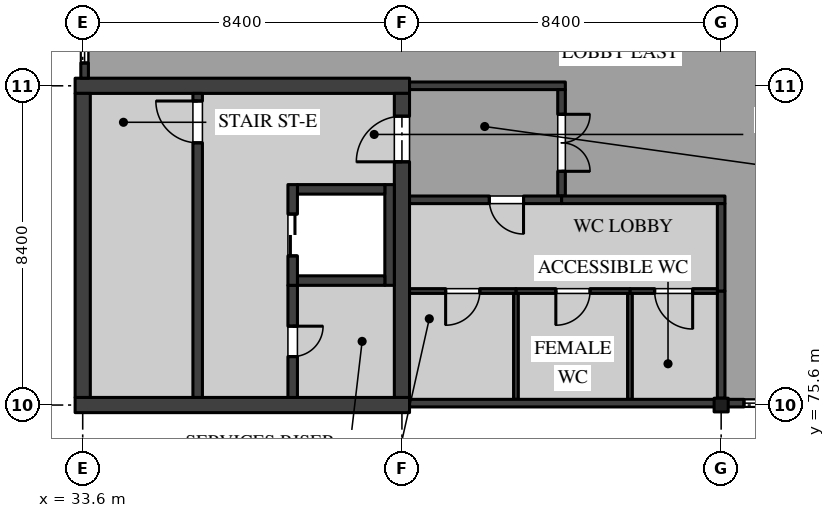
"""IFC4 building model, lengths in metres.
Left out: names, types, materials, properties, quantities, classifications, styles, units other than length and angle.
Written with IfcOpenShell. Run it as: python <this file> out.ifc"""

import sys

from ifc_helpers import new_model, si_unit, direction, frame, frame_2d, origin, origin_2d, place, context, subcontext, project, spatial, rectangle, i_section, extrude, element, fill, save


model = new_model("IFC4")
c1 = context("Model", 3, precision=1e-05, world=origin(), true_north=direction((0.0, 1.0)))
c2 = subcontext(c1, "Body", "Model", "MODEL_VIEW")
j1 = project(units=[si_unit("LENGTHUNIT", "METRE"), si_unit("PLANEANGLEUNIT", "RADIAN")], contexts=[c1])
p1 = place(None, origin())
s1 = spatial("IfcSite", under=j1, at=p1, CompositionType="ELEMENT")
p2 = place(p1, origin())
s2 = spatial("IfcBuilding", under=s1, at=p2, CompositionType="ELEMENT")
p3 = place(p2, frame((0.0, 0.0, 9.9)))
s3 = spatial("IfcBuildingStorey", under=s2, at=p3, CompositionType="ELEMENT", Elevation=9.9)
p4 = place(p3, frame((50.4, 75.6, 0.0), z_axis=(0.0, 0.0, 1.0), x_axis=(1.0, 0.0, 0.0)))
e1 = element("IfcColumn", 1, at=p4, inside=s3, PredefinedType="COLUMN", context=c2, shape_type="SweptSolid", body=[
    extrude(i_section(OverallWidth=0.371, OverallDepth=0.361, WebThickness=0.012, FlangeThickness=0.02, FilletRadius=0.015, at=origin_2d()), origin(), (0.0, 0.0, 1.0), 4.5),
])
for number, where, z_axis, x_axis in (
    (2, (33.4, 75.6, 0.0), (0.0, 0.0, 1.0), (1.0, 0.0, 0.0)),
    (3, (33.4, 84.0, 0.0), (0.0, 0.0, 1.0), (1.0, 0.0, 0.0)),
):
    element("IfcWall", number, at=place(p3, frame(where, z_axis=z_axis, x_axis=x_axis)), inside=s3, PredefinedType="SHEAR", context=c2, shape_type="SweptSolid", body=[
        extrude(rectangle(XDim=8.8, YDim=0.4, at=frame_2d((4.4, 0.0))), origin(), (0.0, 0.0, 1.0), 4.25),
    ])
p5 = place(p3, frame((33.6, 75.8, 0.0), z_axis=(0.0, 0.0, 1.0), x_axis=(0.0, 1.0, 0.0)))
e4 = element("IfcWall", 4, at=p5, inside=s3, PredefinedType="SHEAR", context=c2, shape_type="SweptSolid", body=[
    extrude(rectangle(XDim=8.0, YDim=0.4, at=frame_2d((4.0, 0.0))), origin(), (0.0, 0.0, 1.0), 4.25),
])
p6 = place(p3, frame((42.0, 75.8, 0.0), z_axis=(0.0, 0.0, 1.0), x_axis=(0.0, 1.0, 0.0)))
e5 = element("IfcWall", 5, at=p6, inside=s3, PredefinedType="SHEAR", context=c2, shape_type="SweptSolid", body=[
    extrude(rectangle(XDim=8.0, YDim=0.4, at=frame_2d((4.0, 0.0))), origin(), (0.0, 0.0, 1.0), 4.25),
])
p7 = place(p6, frame((6.2, 0.0, 0.0)))
e6 = element("IfcOpeningElement", 6, at=p7, cuts=e5, PredefinedType="OPENING", context=c2, shape_type="SweptSolid", body=[
    extrude(rectangle(XDim=1.2, YDim=2.1, at=frame_2d((0.6, 1.05))), frame((0.0, 0.21, 0.0), z_axis=(0.0, -1.0, 0.0), x_axis=(1.0, 0.0, 0.0)), (0.0, 0.0, 1.0), 0.42),
])
p8 = place(p3, frame((36.625, 83.8, 0.0), z_axis=(0.0, 0.0, 1.0), x_axis=(0.0, -1.0, 0.0)))
e7 = element("IfcWall", 7, at=p8, inside=s3, PredefinedType="SOLIDWALL", context=c2, shape_type="SweptSolid", body=[
    extrude(rectangle(XDim=8.0, YDim=0.25, at=frame_2d((4.0, 0.0))), origin(), (0.0, 0.0, 1.0), 4.25),
])
p9 = place(p8, frame((0.2, 0.0, 0.0)))
e8 = element("IfcOpeningElement", 8, at=p9, cuts=e7, PredefinedType="OPENING", context=c2, shape_type="SweptSolid", body=[
    extrude(rectangle(XDim=1.1, YDim=2.1, at=frame_2d((0.55, 1.05))), frame((0.0, 0.135, 0.0), z_axis=(0.0, -1.0, 0.0), x_axis=(1.0, 0.0, 0.0)), (0.0, 0.0, 1.0), 0.27),
])
p10 = place(p3, frame((39.125, 78.75, 0.0), z_axis=(0.0, 0.0, 1.0), x_axis=(0.0, -1.0, 0.0)))
e9 = element("IfcWall", 9, at=p10, inside=s3, PredefinedType="SOLIDWALL", context=c2, shape_type="SweptSolid", body=[
    extrude(rectangle(XDim=2.95, YDim=0.25, at=frame_2d((1.475, 0.0))), origin(), (0.0, 0.0, 1.0), 4.25),
])
p11 = place(p10, frame((1.075, 0.0, 0.0)))
e10 = element("IfcOpeningElement", 10, at=p11, cuts=e9, PredefinedType="OPENING", context=c2, shape_type="SweptSolid", body=[
    extrude(rectangle(XDim=0.8, YDim=2.1, at=frame_2d((0.4, 1.05))), frame((0.0, 0.135, 0.0), z_axis=(0.0, -1.0, 0.0), x_axis=(1.0, 0.0, 0.0)), (0.0, 0.0, 1.0), 0.27),
])
p12 = place(p3, frame((41.675, 78.75, 0.0), z_axis=(0.0, 0.0, 1.0), x_axis=(0.0, 1.0, 0.0)))
e11 = element("IfcWall", 11, at=p12, inside=s3, PredefinedType="SOLIDWALL", context=c2, shape_type="SweptSolid", body=[
    extrude(rectangle(XDim=2.65, YDim=0.25, at=frame_2d((1.325, 0.0))), origin(), (0.0, 0.0, 1.0), 4.25),
])
for number, where, z_axis, x_axis in (
    (12, (39.25, 81.275, 0.0), (0.0, 0.0, 1.0), (1.0, 0.0, 0.0)),
    (13, (39.25, 78.875, 0.0), (0.0, 0.0, 1.0), (1.0, 0.0, 0.0)),
):
    element("IfcWall", number, at=place(p3, frame(where, z_axis=z_axis, x_axis=x_axis)), inside=s3, PredefinedType="SOLIDWALL", context=c2, shape_type="SweptSolid", body=[
        extrude(rectangle(XDim=2.3, YDim=0.25, at=frame_2d((1.15, 0.0))), origin(), (0.0, 0.0, 1.0), 4.25),
    ])
p13 = place(p3, frame((39.125, 78.75, 0.0), z_axis=(0.0, 0.0, 1.0), x_axis=(0.0, 1.0, 0.0)))
e14 = element("IfcWall", 14, at=p13, inside=s3, PredefinedType="SOLIDWALL", context=c2, shape_type="SweptSolid", body=[
    extrude(rectangle(XDim=2.65, YDim=0.25, at=frame_2d((1.325, 0.0))), origin(), (0.0, 0.0, 1.0), 4.25),
])
p14 = place(p13, frame((0.775, 0.0, 0.0)))
e15 = element("IfcOpeningElement", 15, at=p14, cuts=e14, PredefinedType="OPENING", context=c2, shape_type="SweptSolid", body=[
    extrude(rectangle(XDim=1.1, YDim=2.1, at=frame_2d((0.55, 1.05))), frame((0.0, 0.135, 0.0), z_axis=(0.0, -1.0, 0.0), x_axis=(1.0, 0.0, 0.0)), (0.0, 0.0, 1.0), 0.27),
])
p15 = place(p3, frame((42.2, 84.0, 0.0), z_axis=(0.0, 0.0, 1.0), x_axis=(1.0, 0.0, 0.0)))
e16 = element("IfcWall", 16, at=p15, inside=s3, PredefinedType="PARTITIONING", context=c2, shape_type="SweptSolid", body=[
    extrude(rectangle(XDim=4.1, YDim=0.2, at=frame_2d((2.05, 0.0))), origin(), (0.0, 0.0, 1.0), 4.25),
])
p16 = place(p3, frame((46.2, 81.1, 0.0), z_axis=(0.0, 0.0, 1.0), x_axis=(0.0, 1.0, 0.0)))
e17 = element("IfcWall", 17, at=p16, inside=s3, PredefinedType="PARTITIONING", context=c2, shape_type="SweptSolid", body=[
    extrude(rectangle(XDim=2.8, YDim=0.2, at=frame_2d((1.4, 0.0))), origin(), (0.0, 0.0, 1.0), 4.25),
])
p17 = place(p16, frame((0.65, 0.0, 0.0)))
e18 = element("IfcOpeningElement", 18, at=p17, cuts=e17, PredefinedType="OPENING", context=c2, shape_type="SweptSolid", body=[
    extrude(rectangle(XDim=1.5, YDim=2.1, at=frame_2d((0.75, 1.05))), frame((0.0, 0.11, 0.0), z_axis=(0.0, -1.0, 0.0), x_axis=(1.0, 0.0, 0.0)), (0.0, 0.0, 1.0), 0.22),
])
p18 = place(p3, frame((50.4, 75.78, 0.0), z_axis=(0.0, 0.0, 1.0), x_axis=(0.0, 1.0, 0.0)))
e19 = element("IfcWall", 19, at=p18, inside=s3, PredefinedType="PARTITIONING", context=c2, shape_type="SweptSolid", body=[
    extrude(rectangle(XDim=2.82, YDim=0.2, at=frame_2d((1.41, 0.0))), origin(), (0.0, 0.0, 1.0), 4.25),
])
p19 = place(p3, frame((46.2, 81.0, 0.0), z_axis=(0.0, 0.0, 1.0), x_axis=(1.0, 0.0, 0.0)))
e20 = element("IfcWall", 20, at=p19, inside=s3, PredefinedType="PARTITIONING", context=c2, shape_type="SweptSolid", body=[
    extrude(rectangle(XDim=4.3, YDim=0.2, at=frame_2d((2.15, 0.0))), origin(), (0.0, 0.0, 1.0), 4.25),
])
p20 = place(p3, frame((50.4, 78.6, 0.0), z_axis=(0.0, 0.0, 1.0), x_axis=(0.0, 1.0, 0.0)))
e21 = element("IfcWall", 21, at=p20, inside=s3, PredefinedType="PARTITIONING", context=c2, shape_type="SweptSolid", body=[
    extrude(rectangle(XDim=2.3, YDim=0.2, at=frame_2d((1.15, 0.0))), origin(), (0.0, 0.0, 1.0), 4.25),
])
p21 = place(p3, frame((42.2, 81.0, 0.0), z_axis=(0.0, 0.0, 1.0), x_axis=(1.0, 0.0, 0.0)))
e22 = element("IfcWall", 22, at=p21, inside=s3, PredefinedType="PARTITIONING", context=c2, shape_type="SweptSolid", body=[
    extrude(rectangle(XDim=4.0, YDim=0.2, at=frame_2d((2.0, 0.0))), origin(), (0.0, 0.0, 1.0), 4.25),
])
p22 = place(p21, frame((2.1, 0.0, 0.0)))
e23 = element("IfcOpeningElement", 23, at=p22, cuts=e22, PredefinedType="OPENING", context=c2, shape_type="SweptSolid", body=[
    extrude(rectangle(XDim=0.9, YDim=2.1, at=frame_2d((0.45, 1.05))), frame((0.0, 0.11, 0.0), z_axis=(0.0, -1.0, 0.0), x_axis=(1.0, 0.0, 0.0)), (0.0, 0.0, 1.0), 0.22),
])
p23 = place(p3, frame((48.0, 75.75, 0.0), z_axis=(0.0, 0.0, 1.0), x_axis=(0.0, 1.0, 0.0)))
e24 = element("IfcWall", 24, at=p23, inside=s3, PredefinedType="PARTITIONING", context=c2, shape_type="SweptSolid", body=[
    extrude(rectangle(XDim=2.787, YDim=0.125, at=frame_2d((1.394, 0.0))), origin(), (0.0, 0.0, 1.0), 4.25),
])
p24 = place(p3, frame((48.0, 78.6, 0.0), z_axis=(0.0, 0.0, 1.0), x_axis=(1.0, 0.0, 0.0)))
e25 = element("IfcWall", 25, at=p24, inside=s3, PredefinedType="PARTITIONING", context=c2, shape_type="SweptSolid", body=[
    extrude(rectangle(XDim=2.3, YDim=0.125, at=frame_2d((1.15, 0.0))), origin(), (0.0, 0.0, 1.0), 4.25),
])
p25 = place(p24, frame((0.65, 0.0, 0.0)))
e26 = element("IfcOpeningElement", 26, at=p25, cuts=e25, PredefinedType="OPENING", context=c2, shape_type="SweptSolid", body=[
    extrude(rectangle(XDim=1.0, YDim=2.1, at=frame_2d((0.5, 1.05))), frame((0.0, 0.073, 0.0), z_axis=(0.0, -1.0, 0.0), x_axis=(1.0, 0.0, 0.0)), (0.0, 0.0, 1.0), 0.145),
])
p26 = place(p3, frame((45.0, 78.6, 0.0), z_axis=(0.0, 0.0, 1.0), x_axis=(1.0, 0.0, 0.0)))
e27 = element("IfcWall", 27, at=p26, inside=s3, PredefinedType="PARTITIONING", context=c2, shape_type="SweptSolid", body=[
    extrude(rectangle(XDim=3.0, YDim=0.125, at=frame_2d((1.5, 0.0))), origin(), (0.0, 0.0, 1.0), 4.25),
])
p27 = place(p26, frame((1.05, 0.0, 0.0)))
e28 = element("IfcOpeningElement", 28, at=p27, cuts=e27, PredefinedType="OPENING", context=c2, shape_type="SweptSolid", body=[
    extrude(rectangle(XDim=0.9, YDim=2.1, at=frame_2d((0.45, 1.05))), frame((0.0, 0.073, 0.0), z_axis=(0.0, -1.0, 0.0), x_axis=(1.0, 0.0, 0.0)), (0.0, 0.0, 1.0), 0.145),
])
p28 = place(p3, frame((45.0, 75.75, 0.0), z_axis=(0.0, 0.0, 1.0), x_axis=(0.0, 1.0, 0.0)))
e29 = element("IfcWall", 29, at=p28, inside=s3, PredefinedType="PARTITIONING", context=c2, shape_type="SweptSolid", body=[
    extrude(rectangle(XDim=2.787, YDim=0.125, at=frame_2d((1.394, 0.0))), origin(), (0.0, 0.0, 1.0), 4.25),
])
p29 = place(p3, frame((42.2, 78.6, 0.0), z_axis=(0.0, 0.0, 1.0), x_axis=(1.0, 0.0, 0.0)))
e30 = element("IfcWall", 30, at=p29, inside=s3, PredefinedType="PARTITIONING", context=c2, shape_type="SweptSolid", body=[
    extrude(rectangle(XDim=2.8, YDim=0.125, at=frame_2d((1.4, 0.0))), origin(), (0.0, 0.0, 1.0), 4.25),
])
p30 = place(p29, frame((0.95, 0.0, 0.0)))
e31 = element("IfcOpeningElement", 31, at=p30, cuts=e30, PredefinedType="OPENING", context=c2, shape_type="SweptSolid", body=[
    extrude(rectangle(XDim=0.9, YDim=2.1, at=frame_2d((0.45, 1.05))), frame((0.0, 0.073, 0.0), z_axis=(0.0, -1.0, 0.0), x_axis=(1.0, 0.0, 0.0)), (0.0, 0.0, 1.0), 0.145),
])
p31 = place(p3, frame((33.65, 92.23, 0.0), z_axis=(0.0, 0.0, 1.0), x_axis=(0.0, -1.0, 0.0)))
e32 = element("IfcWall", 32, at=p31, inside=s3, PredefinedType="SOLIDWALL", context=c2, shape_type="SweptSolid", body=[
    extrude(rectangle(XDim=8.03, YDim=0.2, at=frame_2d((4.015, 0.0))), origin(), (0.0, 0.0, 1.0), 4.5),
])
p32 = place(p31, frame((4.63, 0.0, 0.9)))
e33 = element("IfcOpeningElement", 33, at=p32, cuts=e32, PredefinedType="OPENING", context=c2, shape_type="SweptSolid", body=[
    extrude(rectangle(XDim=3.0, YDim=2.25, at=frame_2d((1.5, 1.125))), frame((0.0, 0.11, 0.0), z_axis=(0.0, -1.0, 0.0), x_axis=(1.0, 0.0, 0.0)), (0.0, 0.0, 1.0), 0.22),
])
p33 = place(p3, frame((42.2, 75.65, 0.0), z_axis=(0.0, 0.0, 1.0), x_axis=(1.0, 0.0, 0.0)))
e34 = element("IfcWall", 34, at=p33, inside=s3, PredefinedType="SOLIDWALL", context=c2, shape_type="SweptSolid", body=[
    extrude(rectangle(XDim=8.196, YDim=0.2, at=frame_2d((4.098, 0.0))), origin(), (0.0, 0.0, 1.0), 4.5),
])
p34 = place(p3, frame((50.404, 75.65, 0.0), z_axis=(0.0, 0.0, 1.0), x_axis=(1.0, 0.0, 0.0)))
e35 = element("IfcWall", 35, at=p34, inside=s3, PredefinedType="SOLIDWALL", context=c2, shape_type="SweptSolid", body=[
    extrude(rectangle(XDim=8.392, YDim=0.2, at=frame_2d((4.196, 0.0))), origin(), (0.0, 0.0, 1.0), 4.5),
])
p35 = place(p34, frame((0.596, 0.0, 0.9)))
e36 = element("IfcOpeningElement", 36, at=p35, cuts=e35, PredefinedType="OPENING", context=c2, shape_type="SweptSolid", body=[
    extrude(rectangle(XDim=3.0, YDim=2.25, at=frame_2d((1.5, 1.125))), frame((0.0, 0.11, 0.0), z_axis=(0.0, -1.0, 0.0), x_axis=(1.0, 0.0, 0.0)), (0.0, 0.0, 1.0), 0.22),
])
p36 = place(p7, origin())
e37 = element("IfcDoor", 37, at=p36, inside=s3, OperationType="SINGLE_SWING_RIGHT", PredefinedType="DOOR", context=c2, shape_type="SweptSolid", body=[
    extrude(rectangle(XDim=1.2, YDim=2.1, at=frame_2d((0.6, 1.05))), frame((0.0, 0.035, 0.0), z_axis=(0.0, -1.0, 0.0), x_axis=(1.0, 0.0, 0.0)), (0.0, 0.0, 1.0), 0.07),
])
fill(e6, e37)
p37 = place(p11, origin())
e38 = element("IfcDoor", 38, at=p37, inside=s3, OperationType="SINGLE_SWING_RIGHT", PredefinedType="DOOR", context=c2, shape_type="SweptSolid", body=[
    extrude(rectangle(XDim=0.8, YDim=2.1, at=frame_2d((0.4, 1.05))), frame((0.0, 0.035, 0.0), z_axis=(0.0, -1.0, 0.0), x_axis=(1.0, 0.0, 0.0)), (0.0, 0.0, 1.0), 0.07),
])
fill(e10, e38)
p38 = place(p9, frame((1.1, 0.0, 0.0), z_axis=(0.0, 0.0, 1.0), x_axis=(-1.0, 0.0, 0.0)))
e39 = element("IfcDoor", 39, at=p38, inside=s3, OperationType="SINGLE_SWING_LEFT", PredefinedType="DOOR", context=c2, shape_type="SweptSolid", body=[
    extrude(rectangle(XDim=1.1, YDim=2.1, at=frame_2d((0.55, 1.05))), frame((0.0, 0.035, 0.0), z_axis=(0.0, -1.0, 0.0), x_axis=(1.0, 0.0, 0.0)), (0.0, 0.0, 1.0), 0.07),
])
fill(e8, e39)
p39 = place(p14, origin())
e40 = element("IfcDoor", 40, at=p39, inside=s3, OperationType="DOUBLE_DOOR_SLIDING", PredefinedType="DOOR", context=c2, shape_type="SweptSolid", body=[
    extrude(rectangle(XDim=1.1, YDim=2.1, at=frame_2d((0.55, 1.05))), frame((0.0, 0.04, 0.0), z_axis=(0.0, -1.0, 0.0), x_axis=(1.0, 0.0, 0.0)), (0.0, 0.0, 1.0), 0.08),
])
fill(e15, e40)
p40 = place(p17, frame((1.5, 0.0, 0.0), z_axis=(0.0, 0.0, 1.0), x_axis=(-1.0, 0.0, 0.0)))
e41 = element("IfcDoor", 41, at=p40, inside=s3, OperationType="DOUBLE_DOOR_SINGLE_SWING", PredefinedType="DOOR", context=c2, shape_type="SweptSolid", body=[
    extrude(rectangle(XDim=1.5, YDim=2.1, at=frame_2d((0.75, 1.05))), frame((0.0, 0.03, 0.0), z_axis=(0.0, -1.0, 0.0), x_axis=(1.0, 0.0, 0.0)), (0.0, 0.0, 1.0), 0.06),
])
fill(e18, e41)
p41 = place(p25, frame((1.0, 0.0, 0.0), z_axis=(0.0, 0.0, 1.0), x_axis=(-1.0, 0.0, 0.0)))
e42 = element("IfcDoor", 42, at=p41, inside=s3, OperationType="SINGLE_SWING_RIGHT", PredefinedType="DOOR", context=c2, shape_type="SweptSolid", body=[
    extrude(rectangle(XDim=1.0, YDim=2.1, at=frame_2d((0.5, 1.05))), frame((0.0, 0.02, 0.0), z_axis=(0.0, -1.0, 0.0), x_axis=(1.0, 0.0, 0.0)), (0.0, 0.0, 1.0), 0.04),
])
fill(e26, e42)
p42 = place(p27, frame((0.9, 0.0, 0.0), z_axis=(0.0, 0.0, 1.0), x_axis=(-1.0, 0.0, 0.0)))
e43 = element("IfcDoor", 43, at=p42, inside=s3, OperationType="SINGLE_SWING_LEFT", PredefinedType="DOOR", context=c2, shape_type="SweptSolid", body=[
    extrude(rectangle(XDim=0.9, YDim=2.1, at=frame_2d((0.45, 1.05))), frame((0.0, 0.02, 0.0), z_axis=(0.0, -1.0, 0.0), x_axis=(1.0, 0.0, 0.0)), (0.0, 0.0, 1.0), 0.04),
])
fill(e28, e43)
p43 = place(p22, frame((0.9, 0.0, 0.0), z_axis=(0.0, 0.0, 1.0), x_axis=(-1.0, 0.0, 0.0)))
e44 = element("IfcDoor", 44, at=p43, inside=s3, OperationType="SINGLE_SWING_RIGHT", PredefinedType="DOOR", context=c2, shape_type="SweptSolid", body=[
    extrude(rectangle(XDim=0.9, YDim=2.1, at=frame_2d((0.45, 1.05))), frame((0.0, 0.03, 0.0), z_axis=(0.0, -1.0, 0.0), x_axis=(1.0, 0.0, 0.0)), (0.0, 0.0, 1.0), 0.06),
])
fill(e23, e44)
p44 = place(p30, frame((0.9, 0.0, 0.0), z_axis=(0.0, 0.0, 1.0), x_axis=(-1.0, 0.0, 0.0)))
e45 = element("IfcDoor", 45, at=p44, inside=s3, OperationType="SINGLE_SWING_LEFT", PredefinedType="DOOR", context=c2, shape_type="SweptSolid", body=[
    extrude(rectangle(XDim=0.9, YDim=2.1, at=frame_2d((0.45, 1.05))), frame((0.0, 0.02, 0.0), z_axis=(0.0, -1.0, 0.0), x_axis=(1.0, 0.0, 0.0)), (0.0, 0.0, 1.0), 0.04),
])
fill(e31, e45)
p45 = place(p32, origin())
e46 = element("IfcWindow", 46, at=p45, inside=s3, PartitioningType="SINGLE_PANEL", PredefinedType="WINDOW", context=c2, shape_type="SweptSolid", body=[
    extrude(rectangle(XDim=3.0, YDim=2.25, at=frame_2d((1.5, 1.125))), frame((0.0, 0.04, 0.0), z_axis=(0.0, -1.0, 0.0), x_axis=(1.0, 0.0, 0.0)), (0.0, 0.0, 1.0), 0.08),
])
fill(e33, e46)
p46 = place(p35, origin())
e47 = element("IfcWindow", 47, at=p46, inside=s3, PartitioningType="SINGLE_PANEL", PredefinedType="WINDOW", context=c2, shape_type="SweptSolid", body=[
    extrude(rectangle(XDim=3.0, YDim=2.25, at=frame_2d((1.5, 1.125))), frame((0.0, 0.04, 0.0), z_axis=(0.0, -1.0, 0.0), x_axis=(1.0, 0.0, 0.0)), (0.0, 0.0, 1.0), 0.08),
])
fill(e36, e47)
save(model, sys.argv[1])
